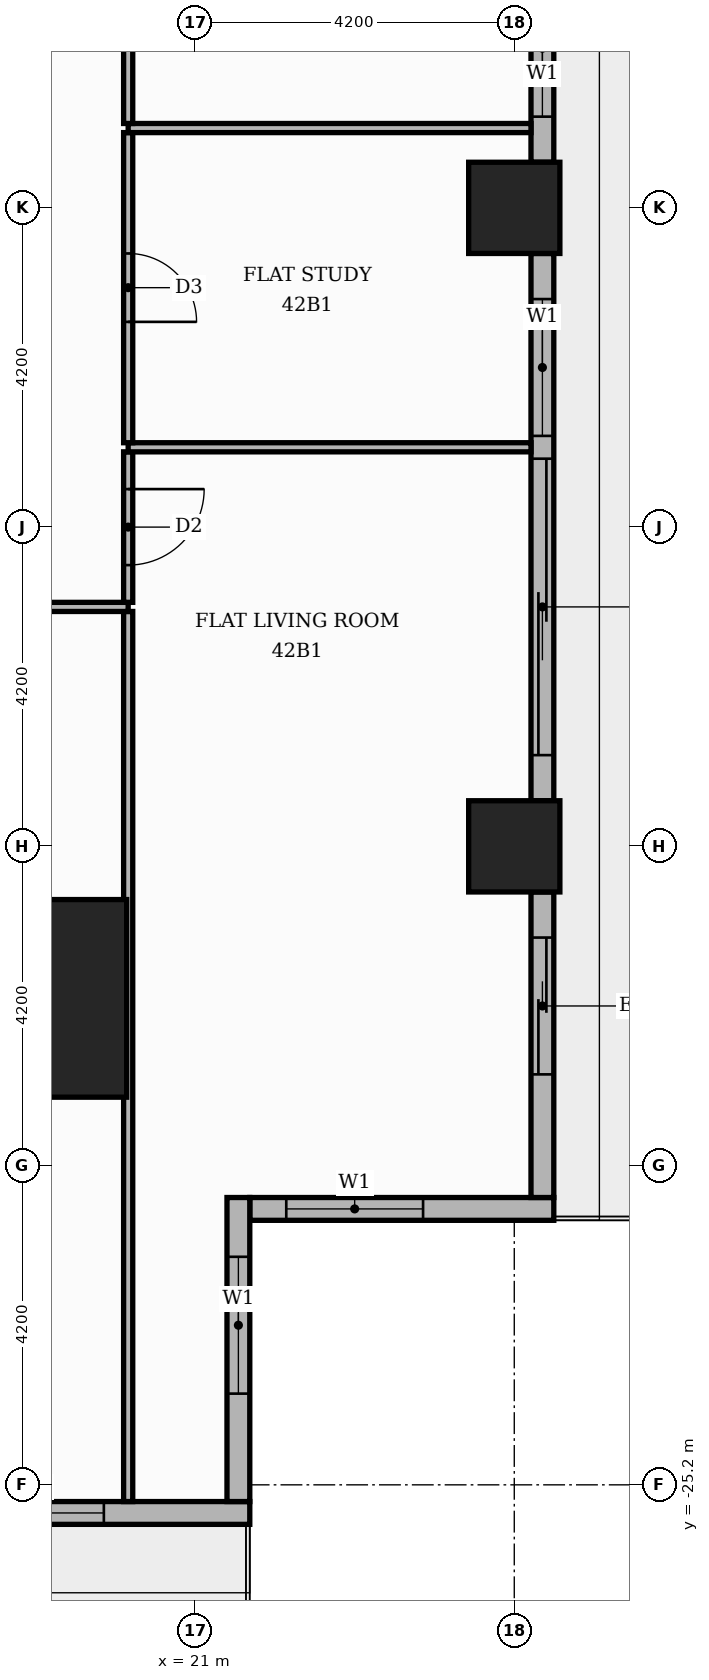
"""IFC4 building model, lengths in metres.
Left out: names, types, materials, properties, quantities, classifications, styles, units other than length and angle.
Written with IfcOpenShell. Run it as: python <this file> out.ifc"""

import sys

from ifc_helpers import new_model, si_unit, direction, frame, frame_2d, origin, origin_2d, place, context, subcontext, project, spatial, rectangle, extrude, element, fill, save


model = new_model("IFC4")
c1 = context("Model", 3, precision=1e-05, world=origin(), true_north=direction((0.0, 1.0)))
c2 = subcontext(c1, "Body", "Model", "MODEL_VIEW")
j1 = project(units=[si_unit("LENGTHUNIT", "METRE"), si_unit("PLANEANGLEUNIT", "RADIAN")], contexts=[c1])
p1 = place(None, origin())
s1 = spatial("IfcSite", under=j1, at=p1, CompositionType="ELEMENT")
p2 = place(p1, origin())
s2 = spatial("IfcBuilding", under=s1, at=p2, CompositionType="ELEMENT")
p3 = place(p2, frame((0.0, 0.0, 176.7)))
s3 = spatial("IfcBuildingStorey", under=s2, at=p3, CompositionType="ELEMENT", Elevation=176.7)
p4 = place(p3, frame((18.8, -18.8, 0.0), z_axis=(0.0, 0.0, 1.0), x_axis=(1.0, 0.0, 0.0)))
e1 = element("IfcColumn", 1, at=p4, inside=s3, PredefinedType="COLUMN", context=c2, shape_type="SweptSolid", body=[
    extrude(rectangle(XDim=2.6, YDim=2.6, at=origin_2d()), origin(), (0.0, 0.0, 1.0), 3.9),
])
for number, where, z_axis, x_axis in (
    (2, (25.2, -8.4, 0.0), (0.0, 0.0, 1.0), (1.0, 0.0, 0.0)),
    (3, (25.2, -16.8, 0.0), (0.0, 0.0, 1.0), (1.0, 0.0, 0.0)),
):
    element("IfcColumn", number, at=place(p3, frame(where, z_axis=z_axis, x_axis=x_axis)), inside=s3, PredefinedType="COLUMN", context=c2, shape_type="SweptSolid", body=[
        extrude(rectangle(XDim=1.2, YDim=1.2, at=origin_2d()), origin(), (0.0, 0.0, 1.0), 3.9),
    ])
p5 = place(p3, frame((21.72, -21.57, 0.0), z_axis=(0.0, 0.0, 1.0), x_axis=(1.0, 0.0, 0.0)))
e4 = element("IfcWall", 4, at=p5, inside=s3, PredefinedType="STANDARD", context=c2, shape_type="SweptSolid", body=[
    extrude(rectangle(XDim=4.0, YDim=0.3, at=frame_2d((2.0, 0.0))), origin(), (0.0, 0.0, 1.0), 3.4),
])
p6 = place(p5, frame((0.48, 0.0, 0.9)))
e5 = element("IfcOpeningElement", 5, at=p6, cuts=e4, PredefinedType="OPENING", context=c2, shape_type="SweptSolid", body=[
    extrude(rectangle(XDim=1.8, YDim=2.1, at=frame_2d((0.9, 1.05))), frame((0.0, 0.16, 0.0), z_axis=(0.0, -1.0, 0.0), x_axis=(1.0, 0.0, 0.0)), (0.0, 0.0, 1.0), 0.32),
])
p7 = place(p3, frame((25.57, -21.42, 0.0), z_axis=(0.0, 0.0, 1.0), x_axis=(0.0, 1.0, 0.0)))
e6 = element("IfcWall", 6, at=p7, inside=s3, PredefinedType="STANDARD", context=c2, shape_type="SweptSolid", body=[
    extrude(rectangle(XDim=4.02, YDim=0.3, at=frame_2d((2.01, 0.0))), origin(), (0.0, 0.0, 1.0), 3.4),
])
p8 = place(p7, frame((1.62, 0.0, 0.0)))
e7 = element("IfcOpeningElement", 7, at=p8, cuts=e6, PredefinedType="OPENING", context=c2, shape_type="SweptSolid", body=[
    extrude(rectangle(XDim=1.8, YDim=2.4, at=frame_2d((0.9, 1.2))), frame((0.0, 0.16, 0.0), z_axis=(0.0, -1.0, 0.0), x_axis=(1.0, 0.0, 0.0)), (0.0, 0.0, 1.0), 0.32),
])
p9 = place(p3, frame((25.57, -16.2, 0.0), z_axis=(0.0, 0.0, 1.0), x_axis=(0.0, 1.0, 0.0)))
e8 = element("IfcWall", 8, at=p9, inside=s3, PredefinedType="STANDARD", context=c2, shape_type="SweptSolid", body=[
    extrude(rectangle(XDim=7.2, YDim=0.3, at=frame_2d((3.6, 0.0))), origin(), (0.0, 0.0, 1.0), 3.4),
])
p10 = place(p9, frame((0.6, 0.0, 0.0)))
e9 = element("IfcOpeningElement", 9, at=p10, cuts=e8, PredefinedType="OPENING", context=c2, shape_type="SweptSolid", body=[
    extrude(rectangle(XDim=3.9, YDim=2.4, at=frame_2d((1.95, 1.2))), frame((0.0, 0.16, 0.0), z_axis=(0.0, -1.0, 0.0), x_axis=(1.0, 0.0, 0.0)), (0.0, 0.0, 1.0), 0.32),
])
p11 = place(p9, frame((4.8, 0.0, 0.9)))
e10 = element("IfcOpeningElement", 10, at=p11, cuts=e8, PredefinedType="OPENING", context=c2, shape_type="SweptSolid", body=[
    extrude(rectangle(XDim=1.8, YDim=2.1, at=frame_2d((0.9, 1.05))), frame((0.0, 0.16, 0.0), z_axis=(0.0, -1.0, 0.0), x_axis=(1.0, 0.0, 0.0)), (0.0, 0.0, 1.0), 0.32),
])
p12 = place(p3, frame((25.57, -7.8, 0.0), z_axis=(0.0, 0.0, 1.0), x_axis=(0.0, 1.0, 0.0)))
e11 = element("IfcWall", 11, at=p12, inside=s3, PredefinedType="STANDARD", context=c2, shape_type="SweptSolid", body=[
    extrude(rectangle(XDim=7.2, YDim=0.3, at=frame_2d((3.6, 0.0))), origin(), (0.0, 0.0, 1.0), 3.4),
])
p13 = place(p12, frame((0.6, 0.0, 0.9)))
e12 = element("IfcOpeningElement", 12, at=p13, cuts=e11, PredefinedType="OPENING", context=c2, shape_type="SweptSolid", body=[
    extrude(rectangle(XDim=1.8, YDim=2.1, at=frame_2d((0.9, 1.05))), frame((0.0, 0.16, 0.0), z_axis=(0.0, -1.0, 0.0), x_axis=(1.0, 0.0, 0.0)), (0.0, 0.0, 1.0), 0.32),
])
p14 = place(p12, frame((2.7, 0.0, 0.0)))
e13 = element("IfcOpeningElement", 13, at=p14, cuts=e11, PredefinedType="OPENING", context=c2, shape_type="SweptSolid", body=[
    extrude(rectangle(XDim=1.8, YDim=2.4, at=frame_2d((0.9, 1.2))), frame((0.0, 0.16, 0.0), z_axis=(0.0, -1.0, 0.0), x_axis=(1.0, 0.0, 0.0)), (0.0, 0.0, 1.0), 0.32),
])
p15 = place(p12, frame((4.8, 0.0, 0.9)))
e14 = element("IfcOpeningElement", 14, at=p15, cuts=e11, PredefinedType="OPENING", context=c2, shape_type="SweptSolid", body=[
    extrude(rectangle(XDim=1.8, YDim=2.1, at=frame_2d((0.9, 1.05))), frame((0.0, 0.16, 0.0), z_axis=(0.0, -1.0, 0.0), x_axis=(1.0, 0.0, 0.0)), (0.0, 0.0, 1.0), 0.32),
])
p16 = place(p3, frame((17.4, -25.57, 0.0), z_axis=(0.0, 0.0, 1.0), x_axis=(1.0, 0.0, 0.0)))
e15 = element("IfcWall", 15, at=p16, inside=s3, PredefinedType="STANDARD", context=c2, shape_type="SweptSolid", body=[
    extrude(rectangle(XDim=4.32, YDim=0.3, at=frame_2d((2.16, 0.0))), origin(), (0.0, 0.0, 1.0), 3.4),
])
p17 = place(p16, frame((0.6, 0.0, 0.9)))
e16 = element("IfcOpeningElement", 16, at=p17, cuts=e15, PredefinedType="OPENING", context=c2, shape_type="SweptSolid", body=[
    extrude(rectangle(XDim=1.8, YDim=2.1, at=frame_2d((0.9, 1.05))), frame((0.0, 0.16, 0.0), z_axis=(0.0, -1.0, 0.0), x_axis=(1.0, 0.0, 0.0)), (0.0, 0.0, 1.0), 0.32),
])
p18 = place(p3, frame((21.57, -25.42, 0.0), z_axis=(0.0, 0.0, 1.0), x_axis=(0.0, 1.0, 0.0)))
e17 = element("IfcWall", 17, at=p18, inside=s3, PredefinedType="STANDARD", context=c2, shape_type="SweptSolid", body=[
    extrude(rectangle(XDim=4.0, YDim=0.3, at=frame_2d((2.0, 0.0))), origin(), (0.0, 0.0, 1.0), 3.4),
])
p19 = place(p18, frame((1.42, 0.0, 0.9)))
e18 = element("IfcOpeningElement", 18, at=p19, cuts=e17, PredefinedType="OPENING", context=c2, shape_type="SweptSolid", body=[
    extrude(rectangle(XDim=1.8, YDim=2.1, at=frame_2d((0.9, 1.05))), frame((0.0, 0.16, 0.0), z_axis=(0.0, -1.0, 0.0), x_axis=(1.0, 0.0, 0.0)), (0.0, 0.0, 1.0), 0.32),
])
p20 = place(p3, frame((20.12, -25.42, 0.0), z_axis=(0.0, 0.0, 1.0), x_axis=(0.0, 1.0, 0.0)))
e19 = element("IfcWall", 19, at=p20, inside=s3, PredefinedType="PARTITIONING", context=c2, shape_type="SweptSolid", body=[
    extrude(rectangle(XDim=11.71, YDim=0.12, at=frame_2d((5.855, 0.0))), origin(), (0.0, 0.0, 1.0), 3.4),
])
p21 = place(p3, frame((13.65, -13.65, 0.0), z_axis=(0.0, 0.0, 1.0), x_axis=(1.0, 0.0, 0.0)))
e20 = element("IfcWall", 20, at=p21, inside=s3, PredefinedType="PARTITIONING", context=c2, shape_type="SweptSolid", body=[
    extrude(rectangle(XDim=6.47, YDim=0.12, at=frame_2d((3.235, 0.0))), origin(), (0.0, 0.0, 1.0), 3.4),
])
p22 = place(p21, frame((2.785, 0.0, 0.0)))
e21 = element("IfcOpeningElement", 21, at=p22, cuts=e20, PredefinedType="OPENING", context=c2, shape_type="SweptSolid", body=[
    extrude(rectangle(XDim=0.9, YDim=2.1, at=frame_2d((0.45, 1.05))), frame((0.0, 0.07, 0.0), z_axis=(0.0, -1.0, 0.0), x_axis=(1.0, 0.0, 0.0)), (0.0, 0.0, 1.0), 0.14),
])
p23 = place(p3, frame((20.12, -13.59, 0.0), z_axis=(0.0, 0.0, 1.0), x_axis=(0.0, 1.0, 0.0)))
e22 = element("IfcWall", 22, at=p23, inside=s3, PredefinedType="PARTITIONING", context=c2, shape_type="SweptSolid", body=[
    extrude(rectangle(XDim=1.98, YDim=0.12, at=frame_2d((0.99, 0.0))), origin(), (0.0, 0.0, 1.0), 3.4),
])
p24 = place(p23, frame((0.49, 0.0, 0.0)))
e23 = element("IfcOpeningElement", 23, at=p24, cuts=e22, PredefinedType="OPENING", context=c2, shape_type="SweptSolid", body=[
    extrude(rectangle(XDim=1.0, YDim=2.1, at=frame_2d((0.5, 1.05))), frame((0.0, 0.07, 0.0), z_axis=(0.0, -1.0, 0.0), x_axis=(1.0, 0.0, 0.0)), (0.0, 0.0, 1.0), 0.14),
])
p25 = place(p3, frame((20.12, -11.55, 0.0), z_axis=(0.0, 0.0, 1.0), x_axis=(1.0, 0.0, 0.0)))
e24 = element("IfcWall", 24, at=p25, inside=s3, PredefinedType="PARTITIONING", context=c2, shape_type="SweptSolid", body=[
    extrude(rectangle(XDim=5.3, YDim=0.12, at=frame_2d((2.65, 0.0))), origin(), (0.0, 0.0, 1.0), 3.4),
])
p26 = place(p3, frame((20.12, -11.49, 0.0), z_axis=(0.0, 0.0, 1.0), x_axis=(0.0, 1.0, 0.0)))
e25 = element("IfcWall", 25, at=p26, inside=s3, PredefinedType="PARTITIONING", context=c2, shape_type="SweptSolid", body=[
    extrude(rectangle(XDim=4.08, YDim=0.12, at=frame_2d((2.04, 0.0))), origin(), (0.0, 0.0, 1.0), 3.4),
])
p27 = place(p26, frame((1.59, 0.0, 0.0)))
e26 = element("IfcOpeningElement", 26, at=p27, cuts=e25, PredefinedType="OPENING", context=c2, shape_type="SweptSolid", body=[
    extrude(rectangle(XDim=0.9, YDim=2.1, at=frame_2d((0.45, 1.05))), frame((0.0, 0.07, 0.0), z_axis=(0.0, -1.0, 0.0), x_axis=(1.0, 0.0, 0.0)), (0.0, 0.0, 1.0), 0.14),
])
p28 = place(p3, frame((20.12, -7.35, 0.0), z_axis=(0.0, 0.0, 1.0), x_axis=(1.0, 0.0, 0.0)))
e27 = element("IfcWall", 27, at=p28, inside=s3, PredefinedType="PARTITIONING", context=c2, shape_type="SweptSolid", body=[
    extrude(rectangle(XDim=5.3, YDim=0.12, at=frame_2d((2.65, 0.0))), origin(), (0.0, 0.0, 1.0), 3.4),
])
p29 = place(p3, frame((20.12, -7.29, 0.0), z_axis=(0.0, 0.0, 1.0), x_axis=(0.0, 1.0, 0.0)))
e28 = element("IfcWall", 28, at=p29, inside=s3, PredefinedType="PARTITIONING", context=c2, shape_type="SweptSolid", body=[
    extrude(rectangle(XDim=4.08, YDim=0.12, at=frame_2d((2.04, 0.0))), origin(), (0.0, 0.0, 1.0), 3.4),
])
p30 = place(p29, frame((1.59, 0.0, 0.0)))
e29 = element("IfcOpeningElement", 29, at=p30, cuts=e28, PredefinedType="OPENING", context=c2, shape_type="SweptSolid", body=[
    extrude(rectangle(XDim=0.9, YDim=2.1, at=frame_2d((0.45, 1.05))), frame((0.0, 0.07, 0.0), z_axis=(0.0, -1.0, 0.0), x_axis=(1.0, 0.0, 0.0)), (0.0, 0.0, 1.0), 0.14),
])
p31 = place(p6, origin())
e30 = element("IfcWindow", 30, at=p31, inside=s3, PartitioningType="SINGLE_PANEL", PredefinedType="WINDOW", context=c2, shape_type="SweptSolid", body=[
    extrude(rectangle(XDim=1.8, YDim=2.1, at=frame_2d((0.9, 1.05))), frame((0.0, 0.03, 0.0), z_axis=(0.0, -1.0, 0.0), x_axis=(1.0, 0.0, 0.0)), (0.0, 0.0, 1.0), 0.06),
])
fill(e5, e30)
p32 = place(p8, origin())
e31 = element("IfcDoor", 31, at=p32, inside=s3, OperationType="SLIDING_TO_RIGHT", PredefinedType="DOOR", context=c2, shape_type="SweptSolid", body=[
    extrude(rectangle(XDim=1.8, YDim=2.4, at=frame_2d((0.9, 1.2))), frame((0.0, 0.025, 0.0), z_axis=(0.0, -1.0, 0.0), x_axis=(1.0, 0.0, 0.0)), (0.0, 0.0, 1.0), 0.05),
])
fill(e7, e31)
p33 = place(p10, origin())
e32 = element("IfcDoor", 32, at=p33, inside=s3, OperationType="SLIDING_TO_LEFT", PredefinedType="DOOR", context=c2, shape_type="SweptSolid", body=[
    extrude(rectangle(XDim=3.9, YDim=2.4, at=frame_2d((1.95, 1.2))), frame((0.0, 0.025, 0.0), z_axis=(0.0, -1.0, 0.0), x_axis=(1.0, 0.0, 0.0)), (0.0, 0.0, 1.0), 0.05),
])
fill(e9, e32)
p34 = place(p11, origin())
e33 = element("IfcWindow", 33, at=p34, inside=s3, PartitioningType="SINGLE_PANEL", PredefinedType="WINDOW", context=c2, shape_type="SweptSolid", body=[
    extrude(rectangle(XDim=1.8, YDim=2.1, at=frame_2d((0.9, 1.05))), frame((0.0, 0.03, 0.0), z_axis=(0.0, -1.0, 0.0), x_axis=(1.0, 0.0, 0.0)), (0.0, 0.0, 1.0), 0.06),
])
fill(e10, e33)
p35 = place(p13, origin())
e34 = element("IfcWindow", 34, at=p35, inside=s3, PartitioningType="SINGLE_PANEL", PredefinedType="WINDOW", context=c2, shape_type="SweptSolid", body=[
    extrude(rectangle(XDim=1.8, YDim=2.1, at=frame_2d((0.9, 1.05))), frame((0.0, 0.03, 0.0), z_axis=(0.0, -1.0, 0.0), x_axis=(1.0, 0.0, 0.0)), (0.0, 0.0, 1.0), 0.06),
])
fill(e12, e34)
p36 = place(p17, origin())
e35 = element("IfcWindow", 35, at=p36, inside=s3, PartitioningType="SINGLE_PANEL", PredefinedType="WINDOW", context=c2, shape_type="SweptSolid", body=[
    extrude(rectangle(XDim=1.8, YDim=2.1, at=frame_2d((0.9, 1.05))), frame((0.0, 0.03, 0.0), z_axis=(0.0, -1.0, 0.0), x_axis=(1.0, 0.0, 0.0)), (0.0, 0.0, 1.0), 0.06),
])
fill(e16, e35)
p37 = place(p19, origin())
e36 = element("IfcWindow", 36, at=p37, inside=s3, PartitioningType="SINGLE_PANEL", PredefinedType="WINDOW", context=c2, shape_type="SweptSolid", body=[
    extrude(rectangle(XDim=1.8, YDim=2.1, at=frame_2d((0.9, 1.05))), frame((0.0, 0.03, 0.0), z_axis=(0.0, -1.0, 0.0), x_axis=(1.0, 0.0, 0.0)), (0.0, 0.0, 1.0), 0.06),
])
fill(e18, e36)
p38 = place(p24, frame((1.0, 0.0, 0.0), z_axis=(0.0, 0.0, 1.0), x_axis=(-1.0, 0.0, 0.0)))
e37 = element("IfcDoor", 37, at=p38, inside=s3, OperationType="SINGLE_SWING_RIGHT", PredefinedType="DOOR", context=c2, shape_type="SweptSolid", body=[
    extrude(rectangle(XDim=1.0, YDim=2.1, at=frame_2d((0.5, 1.05))), frame((0.0, 0.025, 0.0), z_axis=(0.0, -1.0, 0.0), x_axis=(1.0, 0.0, 0.0)), (0.0, 0.0, 1.0), 0.05),
])
fill(e23, e37)
p39 = place(p27, frame((0.9, 0.0, 0.0), z_axis=(0.0, 0.0, 1.0), x_axis=(-1.0, 0.0, 0.0)))
e38 = element("IfcDoor", 38, at=p39, inside=s3, OperationType="SINGLE_SWING_LEFT", PredefinedType="DOOR", context=c2, shape_type="SweptSolid", body=[
    extrude(rectangle(XDim=0.9, YDim=2.1, at=frame_2d((0.45, 1.05))), frame((0.0, 0.025, 0.0), z_axis=(0.0, -1.0, 0.0), x_axis=(1.0, 0.0, 0.0)), (0.0, 0.0, 1.0), 0.05),
])
fill(e26, e38)
save(model, sys.argv[1])
